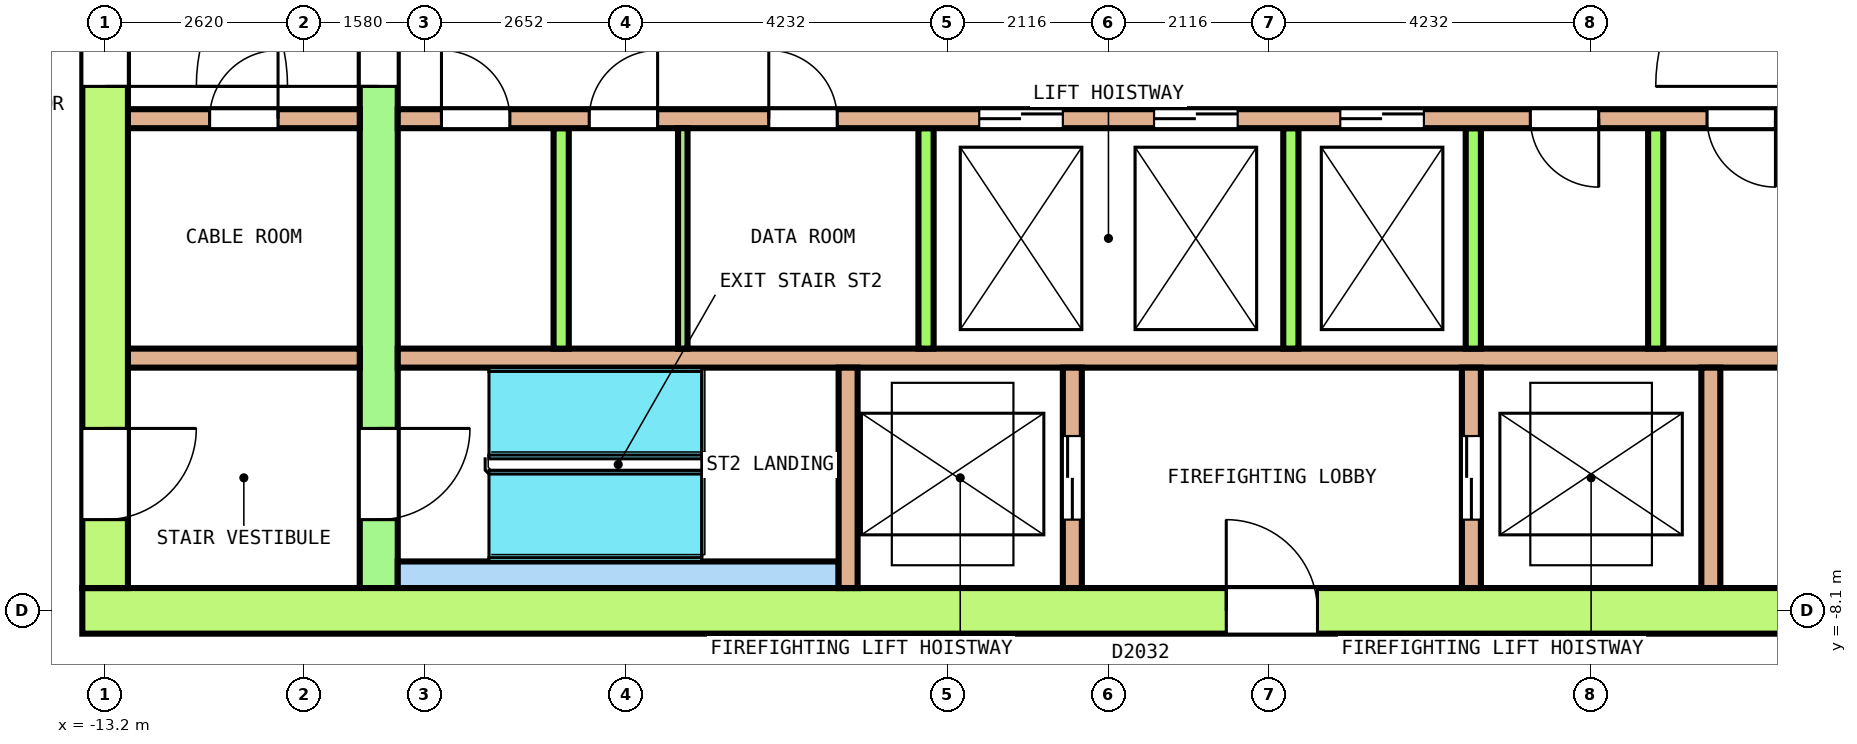
"""IFC4 building model, lengths in metres.
Left out: names, types, materials, properties, quantities, classifications, styles, units other than length and angle.
Written with IfcOpenShell. Run it as: python <this file> out.ifc"""

import sys

from ifc_helpers import new_model, si_unit, direction, frame, frame_2d, origin, place, context, subcontext, project, spatial, polyline, rectangle, outline, extrude, element, fill, save


model = new_model("IFC4")
c1 = context("Model", 3, precision=1e-05, world=origin(), true_north=direction((0.0, 1.0)))
c2 = subcontext(c1, "Body", "Model", "MODEL_VIEW")
j1 = project(units=[si_unit("LENGTHUNIT", "METRE"), si_unit("PLANEANGLEUNIT", "RADIAN")], contexts=[c1])
p1 = place(None, origin())
s1 = spatial("IfcSite", under=j1, at=p1, CompositionType="ELEMENT")
p2 = place(p1, origin())
s2 = spatial("IfcBuilding", under=s1, at=p2, CompositionType="ELEMENT")
p3 = place(p2, frame((0.0, 0.0, 241.4)))
s3 = spatial("IfcBuildingStorey", under=s2, at=p3, CompositionType="ELEMENT", Elevation=241.4)
p4 = place(p3, frame((-23.479, -2.134, 0.0), z_axis=(0.0, 0.0, 1.0), x_axis=(0.500004117472, -0.866023026548, 0.0)))
e1 = element("IfcWall", 1, at=p4, inside=s3, PredefinedType="SOLIDWALL", context=c2, shape_type="SweptSolid", body=[
    extrude(outline(polyline([(-0.027, -0.1), (1.017, -0.1), (2.061, -0.1), (3.105, -0.1), (4.149, -0.1), (5.193, -0.1), (6.237, -0.1), (7.281, -0.1), (8.325, -0.1), (9.369, -0.1), (10.414, -0.1), (11.458, -0.1), (12.501, -0.1), (13.546, -0.1), (14.59, -0.1), (15.634, -0.1), (16.678, -0.1), (17.722, -0.1), (18.766, -0.1), (19.81, -0.1), (19.756, 0.1), (18.718, 0.1), (17.679, 0.1), (16.641, 0.1), (15.603, 0.1), (14.564, 0.1), (13.526, 0.1), (12.488, 0.1), (11.449, 0.1), (10.411, 0.1), (9.372, 0.1), (8.334, 0.1), (7.295, 0.1), (6.257, 0.1), (5.219, 0.1), (4.18, 0.1), (3.142, 0.1), (2.104, 0.1), (1.065, 0.1), (0.027, 0.1), (-0.027, -0.1)])), origin(), (0.0, 0.0, 1.0), 3.7),
])
p5 = place(p4, frame((0.528, 0.0, 0.1)))
e2 = element("IfcOpeningElement", 2, at=p5, cuts=e1, PredefinedType="OPENING", context=c2, shape_type="SweptSolid", body=[
    extrude(rectangle(XDim=2.9, YDim=2.65, at=frame_2d((1.45, 1.325))), frame((0.0, 0.11, 0.0), z_axis=(0.0, -1.0, 0.0), x_axis=(1.0, 0.0, 0.0)), (0.0, 0.0, 1.0), 0.22),
])
p6 = place(p4, frame((4.485, 0.0, 0.1)))
e3 = element("IfcOpeningElement", 3, at=p6, cuts=e1, PredefinedType="OPENING", context=c2, shape_type="SweptSolid", body=[
    extrude(rectangle(XDim=2.9, YDim=2.65, at=frame_2d((1.45, 1.325))), frame((0.0, 0.11, 0.0), z_axis=(0.0, -1.0, 0.0), x_axis=(1.0, 0.0, 0.0)), (0.0, 0.0, 1.0), 0.22),
])
p7 = place(p4, frame((8.991, 0.0, 0.0)))
e4 = element("IfcOpeningElement", 4, at=p7, cuts=e1, PredefinedType="OPENING", context=c2, shape_type="SweptSolid", body=[
    extrude(rectangle(XDim=1.8, YDim=2.4, at=frame_2d((0.9, 1.2))), frame((0.0, 0.11, 0.0), z_axis=(0.0, -1.0, 0.0), x_axis=(1.0, 0.0, 0.0)), (0.0, 0.0, 1.0), 0.22),
])
p8 = place(p4, frame((8.991, 0.0, 2.55)))
e5 = element("IfcOpeningElement", 5, at=p8, cuts=e1, PredefinedType="OPENING", context=c2, shape_type="SweptSolid", body=[
    extrude(rectangle(XDim=1.8, YDim=0.2, at=frame_2d((0.9, 0.1))), frame((0.0, 0.11, 0.0), z_axis=(0.0, -1.0, 0.0), x_axis=(1.0, 0.0, 0.0)), (0.0, 0.0, 1.0), 0.22),
])
p9 = place(p4, frame((12.398, 0.0, 0.1)))
e6 = element("IfcOpeningElement", 6, at=p9, cuts=e1, PredefinedType="OPENING", context=c2, shape_type="SweptSolid", body=[
    extrude(rectangle(XDim=2.9, YDim=2.65, at=frame_2d((1.45, 1.325))), frame((0.0, 0.11, 0.0), z_axis=(0.0, -1.0, 0.0), x_axis=(1.0, 0.0, 0.0)), (0.0, 0.0, 1.0), 0.22),
])
p10 = place(p4, frame((16.355, 0.0, 0.1)))
e7 = element("IfcOpeningElement", 7, at=p10, cuts=e1, PredefinedType="OPENING", context=c2, shape_type="SweptSolid", body=[
    extrude(rectangle(XDim=2.9, YDim=2.65, at=frame_2d((1.45, 1.325))), frame((0.0, 0.11, 0.0), z_axis=(0.0, -1.0, 0.0), x_axis=(1.0, 0.0, 0.0)), (0.0, 0.0, 1.0), 0.22),
])
p11 = place(p3, frame((-13.5, -8.1, 0.0), z_axis=(0.0, 0.0, 1.0), x_axis=(1.0, 0.0, 0.0)))
e8 = element("IfcWall", 8, at=p11, inside=s3, PredefinedType="SHEAR", context=c2, shape_type="SweptSolid", body=[
    extrude(rectangle(XDim=27.0, YDim=0.6, at=frame_2d((13.5, 0.0))), origin(), (0.0, 0.0, 1.0), 3.7),
])
p12 = place(p11, frame((15.05, 0.0, 0.0)))
e9 = element("IfcOpeningElement", 9, at=p12, cuts=e8, PredefinedType="OPENING", context=c2, shape_type="SweptSolid", body=[
    extrude(rectangle(XDim=1.2, YDim=2.1, at=frame_2d((0.6, 1.05))), frame((0.0, 0.31, 0.0), z_axis=(0.0, -1.0, 0.0), x_axis=(1.0, 0.0, 0.0)), (0.0, 0.0, 1.0), 0.62),
])
p13 = place(p3, frame((-13.2, -7.8, 0.0), z_axis=(0.0, 0.0, 1.0), x_axis=(0.0, 1.0, 0.0)))
e10 = element("IfcWall", 10, at=p13, inside=s3, PredefinedType="SHEAR", context=c2, shape_type="SweptSolid", body=[
    extrude(rectangle(XDim=15.6, YDim=0.6, at=frame_2d((7.8, 0.0))), origin(), (0.0, 0.0, 1.0), 3.7),
])
p14 = place(p13, frame((6.6, 0.0, 0.0)))
e11 = element("IfcOpeningElement", 11, at=p14, cuts=e10, PredefinedType="OPENING", context=c2, shape_type="SweptSolid", body=[
    extrude(rectangle(XDim=2.4, YDim=2.1, at=frame_2d((1.2, 1.05))), frame((0.0, 0.31, 0.0), z_axis=(0.0, -1.0, 0.0), x_axis=(1.0, 0.0, 0.0)), (0.0, 0.0, 1.0), 0.62),
])
p15 = place(p13, frame((13.5, 0.0, 0.0)))
e12 = element("IfcOpeningElement", 12, at=p15, cuts=e10, PredefinedType="OPENING", context=c2, shape_type="SweptSolid", body=[
    extrude(rectangle(XDim=1.2, YDim=2.1, at=frame_2d((0.6, 1.05))), frame((0.0, 0.31, 0.0), z_axis=(0.0, -1.0, 0.0), x_axis=(1.0, 0.0, 0.0)), (0.0, 0.0, 1.0), 0.62),
])
p16 = place(p13, frame((0.9, 0.0, 0.0)))
e13 = element("IfcOpeningElement", 13, at=p16, cuts=e10, PredefinedType="OPENING", context=c2, shape_type="SweptSolid", body=[
    extrude(rectangle(XDim=1.2, YDim=2.1, at=frame_2d((0.6, 1.05))), frame((0.0, 0.31, 0.0), z_axis=(0.0, -1.0, 0.0), x_axis=(1.0, 0.0, 0.0)), (0.0, 0.0, 1.0), 0.62),
])
p17 = place(p3, frame((-9.6, -7.8, 0.0), z_axis=(0.0, 0.0, 1.0), x_axis=(0.0, 1.0, 0.0)))
e14 = element("IfcWall", 14, at=p17, inside=s3, PredefinedType="SHEAR", context=c2, shape_type="SweptSolid", body=[
    extrude(rectangle(XDim=15.6, YDim=0.5, at=frame_2d((7.8, 0.0))), origin(), (0.0, 0.0, 1.0), 3.7),
])
p18 = place(p17, frame((6.6, 0.0, 0.0)))
e15 = element("IfcOpeningElement", 15, at=p18, cuts=e14, PredefinedType="OPENING", context=c2, shape_type="SweptSolid", body=[
    extrude(rectangle(XDim=2.4, YDim=2.1, at=frame_2d((1.2, 1.05))), frame((0.0, 0.26, 0.0), z_axis=(0.0, -1.0, 0.0), x_axis=(1.0, 0.0, 0.0)), (0.0, 0.0, 1.0), 0.52),
])
p19 = place(p17, frame((13.5, 0.0, 0.0)))
e16 = element("IfcOpeningElement", 16, at=p19, cuts=e14, PredefinedType="OPENING", context=c2, shape_type="SweptSolid", body=[
    extrude(rectangle(XDim=1.2, YDim=2.1, at=frame_2d((0.6, 1.05))), frame((0.0, 0.26, 0.0), z_axis=(0.0, -1.0, 0.0), x_axis=(1.0, 0.0, 0.0)), (0.0, 0.0, 1.0), 0.52),
])
p20 = place(p17, frame((0.9, 0.0, 0.0)))
e17 = element("IfcOpeningElement", 17, at=p20, cuts=e14, PredefinedType="OPENING", context=c2, shape_type="SweptSolid", body=[
    extrude(rectangle(XDim=1.2, YDim=2.1, at=frame_2d((0.6, 1.05))), frame((0.0, 0.26, 0.0), z_axis=(0.0, -1.0, 0.0), x_axis=(1.0, 0.0, 0.0)), (0.0, 0.0, 1.0), 0.52),
])
p21 = place(p3, frame((-12.9, -1.625, 0.0), z_axis=(0.0, 0.0, 1.0), x_axis=(1.0, 0.0, 0.0)))
e18 = element("IfcWall", 18, at=p21, inside=s3, PredefinedType="SOLIDWALL", context=c2, shape_type="SweptSolid", body=[
    extrude(rectangle(XDim=3.05, YDim=0.25, at=frame_2d((1.525, 0.0))), origin(), (0.0, 0.0, 1.0), 3.7),
])
p22 = place(p21, frame((1.075, 0.0, 0.0)))
e19 = element("IfcOpeningElement", 19, at=p22, cuts=e18, PredefinedType="OPENING", context=c2, shape_type="SweptSolid", body=[
    extrude(rectangle(XDim=0.9, YDim=2.1, at=frame_2d((0.45, 1.05))), frame((0.0, 0.135, 0.0), z_axis=(0.0, -1.0, 0.0), x_axis=(1.0, 0.0, 0.0)), (0.0, 0.0, 1.0), 0.27),
])
p23 = place(p3, frame((-9.35, -1.625, 0.0), z_axis=(0.0, 0.0, 1.0), x_axis=(1.0, 0.0, 0.0)))
e20 = element("IfcWall", 20, at=p23, inside=s3, PredefinedType="SOLIDWALL", context=c2, shape_type="SweptSolid", body=[
    extrude(rectangle(XDim=18.7, YDim=0.25, at=frame_2d((9.35, 0.0))), origin(), (0.0, 0.0, 1.0), 3.7),
])
p24 = place(p23, frame((7.65, 0.0, 0.0)))
e21 = element("IfcOpeningElement", 21, at=p24, cuts=e20, PredefinedType="OPENING", context=c2, shape_type="SweptSolid", body=[
    extrude(rectangle(XDim=1.1, YDim=2.1, at=frame_2d((0.55, 1.05))), frame((0.0, 0.135, 0.0), z_axis=(0.0, -1.0, 0.0), x_axis=(1.0, 0.0, 0.0)), (0.0, 0.0, 1.0), 0.27),
])
p25 = place(p23, frame((9.95, 0.0, 0.0)))
e22 = element("IfcOpeningElement", 22, at=p25, cuts=e20, PredefinedType="OPENING", context=c2, shape_type="SweptSolid", body=[
    extrude(rectangle(XDim=1.1, YDim=2.1, at=frame_2d((0.55, 1.05))), frame((0.0, 0.135, 0.0), z_axis=(0.0, -1.0, 0.0), x_axis=(1.0, 0.0, 0.0)), (0.0, 0.0, 1.0), 0.27),
])
p26 = place(p23, frame((12.4, 0.0, 0.0)))
e23 = element("IfcOpeningElement", 23, at=p26, cuts=e20, PredefinedType="OPENING", context=c2, shape_type="SweptSolid", body=[
    extrude(rectangle(XDim=1.1, YDim=2.1, at=frame_2d((0.55, 1.05))), frame((0.0, 0.135, 0.0), z_axis=(0.0, -1.0, 0.0), x_axis=(1.0, 0.0, 0.0)), (0.0, 0.0, 1.0), 0.27),
])
p27 = place(p23, frame((0.575, 0.0, 0.0)))
e24 = element("IfcOpeningElement", 24, at=p27, cuts=e20, PredefinedType="OPENING", context=c2, shape_type="SweptSolid", body=[
    extrude(rectangle(XDim=0.9, YDim=2.1, at=frame_2d((0.45, 1.05))), frame((0.0, 0.135, 0.0), z_axis=(0.0, -1.0, 0.0), x_axis=(1.0, 0.0, 0.0)), (0.0, 0.0, 1.0), 0.27),
])
p28 = place(p23, frame((2.519, 0.0, 0.0)))
e25 = element("IfcOpeningElement", 25, at=p28, cuts=e20, PredefinedType="OPENING", context=c2, shape_type="SweptSolid", body=[
    extrude(rectangle(XDim=0.9, YDim=2.1, at=frame_2d((0.45, 1.05))), frame((0.0, 0.135, 0.0), z_axis=(0.0, -1.0, 0.0), x_axis=(1.0, 0.0, 0.0)), (0.0, 0.0, 1.0), 0.27),
])
p29 = place(p23, frame((4.881, 0.0, 0.0)))
e26 = element("IfcOpeningElement", 26, at=p29, cuts=e20, PredefinedType="OPENING", context=c2, shape_type="SweptSolid", body=[
    extrude(rectangle(XDim=0.9, YDim=2.1, at=frame_2d((0.45, 1.05))), frame((0.0, 0.135, 0.0), z_axis=(0.0, -1.0, 0.0), x_axis=(1.0, 0.0, 0.0)), (0.0, 0.0, 1.0), 0.27),
])
p30 = place(p23, frame((14.9, 0.0, 0.0)))
e27 = element("IfcOpeningElement", 27, at=p30, cuts=e20, PredefinedType="OPENING", context=c2, shape_type="SweptSolid", body=[
    extrude(rectangle(XDim=0.9, YDim=2.1, at=frame_2d((0.45, 1.05))), frame((0.0, 0.135, 0.0), z_axis=(0.0, -1.0, 0.0), x_axis=(1.0, 0.0, 0.0)), (0.0, 0.0, 1.0), 0.27),
])
p31 = place(p23, frame((17.225, 0.0, 0.0)))
e28 = element("IfcOpeningElement", 28, at=p31, cuts=e20, PredefinedType="OPENING", context=c2, shape_type="SweptSolid", body=[
    extrude(rectangle(XDim=0.9, YDim=2.1, at=frame_2d((0.45, 1.05))), frame((0.0, 0.135, 0.0), z_axis=(0.0, -1.0, 0.0), x_axis=(1.0, 0.0, 0.0)), (0.0, 0.0, 1.0), 0.27),
])
p32 = place(p3, frame((-12.9, -4.775, 0.0), z_axis=(0.0, 0.0, 1.0), x_axis=(1.0, 0.0, 0.0)))
e29 = element("IfcWall", 29, at=p32, inside=s3, PredefinedType="SOLIDWALL", context=c2, shape_type="SweptSolid", body=[
    extrude(rectangle(XDim=3.05, YDim=0.25, at=frame_2d((1.525, 0.0))), origin(), (0.0, 0.0, 1.0), 3.7),
])
p33 = place(p3, frame((-9.35, -4.775, 0.0), z_axis=(0.0, 0.0, 1.0), x_axis=(1.0, 0.0, 0.0)))
e30 = element("IfcWall", 30, at=p33, inside=s3, PredefinedType="SOLIDWALL", context=c2, shape_type="SweptSolid", body=[
    extrude(rectangle(XDim=18.7, YDim=0.25, at=frame_2d((9.35, 0.0))), origin(), (0.0, 0.0, 1.0), 3.7),
])
for number, where, z_axis, x_axis in (
    (31, (-7.2, -4.65, 0.0), (0.0, 0.0, 1.0), (0.0, 1.0, 0.0)),
    (32, (-2.4, -4.65, 0.0), (0.0, 0.0, 1.0), (0.0, 1.0, 0.0)),
    (33, (2.4, -4.65, 0.0), (0.0, 0.0, 1.0), (0.0, 1.0, 0.0)),
    (34, (4.8, -4.65, 0.0), (0.0, 0.0, 1.0), (0.0, 1.0, 0.0)),
    (35, (7.2, -4.65, 0.0), (0.0, 0.0, 1.0), (0.0, 1.0, 0.0)),
):
    element("IfcWall", number, at=place(p3, frame(where, z_axis=z_axis, x_axis=x_axis)), inside=s3, PredefinedType="SOLIDWALL", context=c2, shape_type="SweptSolid", body=[
        extrude(rectangle(XDim=2.9, YDim=0.2, at=frame_2d((1.45, 0.0))), origin(), (0.0, 0.0, 1.0), 3.7),
    ])
p34 = place(p3, frame((-9.35, -7.625, 0.0), z_axis=(0.0, 0.0, 1.0), x_axis=(1.0, 0.0, 0.0)))
e36 = element("IfcWall", 36, at=p34, inside=s3, PredefinedType="SOLIDWALL", context=c2, shape_type="SweptSolid", body=[
    extrude(rectangle(XDim=5.8, YDim=0.35, at=frame_2d((2.9, 0.0))), origin(), (0.0, 0.0, 1.0), 3.7),
])
p35 = place(p3, frame((-3.425, -7.8, 0.0), z_axis=(0.0, 0.0, 1.0), x_axis=(0.0, 1.0, 0.0)))
e37 = element("IfcWall", 37, at=p35, inside=s3, PredefinedType="SOLIDWALL", context=c2, shape_type="SweptSolid", body=[
    extrude(rectangle(XDim=2.9, YDim=0.25, at=frame_2d((1.45, 0.0))), origin(), (0.0, 0.0, 1.0), 3.7),
])
p36 = place(p3, frame((-0.475, -7.8, 0.0), z_axis=(0.0, 0.0, 1.0), x_axis=(0.0, 1.0, 0.0)))
e38 = element("IfcWall", 38, at=p36, inside=s3, PredefinedType="SOLIDWALL", context=c2, shape_type="SweptSolid", body=[
    extrude(rectangle(XDim=2.9, YDim=0.25, at=frame_2d((1.45, 0.0))), origin(), (0.0, 0.0, 1.0), 3.7),
])
p37 = place(p36, frame((0.9, 0.0, 0.0)))
e39 = element("IfcOpeningElement", 39, at=p37, cuts=e38, PredefinedType="OPENING", context=c2, shape_type="SweptSolid", body=[
    extrude(rectangle(XDim=1.1, YDim=2.1, at=frame_2d((0.55, 1.05))), frame((0.0, 0.135, 0.0), z_axis=(0.0, -1.0, 0.0), x_axis=(1.0, 0.0, 0.0)), (0.0, 0.0, 1.0), 0.27),
])
p38 = place(p3, frame((4.775, -7.8, 0.0), z_axis=(0.0, 0.0, 1.0), x_axis=(0.0, 1.0, 0.0)))
e40 = element("IfcWall", 40, at=p38, inside=s3, PredefinedType="SOLIDWALL", context=c2, shape_type="SweptSolid", body=[
    extrude(rectangle(XDim=2.9, YDim=0.25, at=frame_2d((1.45, 0.0))), origin(), (0.0, 0.0, 1.0), 3.7),
])
p39 = place(p38, frame((0.9, 0.0, 0.0)))
e41 = element("IfcOpeningElement", 41, at=p39, cuts=e40, PredefinedType="OPENING", context=c2, shape_type="SweptSolid", body=[
    extrude(rectangle(XDim=1.1, YDim=2.1, at=frame_2d((0.55, 1.05))), frame((0.0, 0.135, 0.0), z_axis=(0.0, -1.0, 0.0), x_axis=(1.0, 0.0, 0.0)), (0.0, 0.0, 1.0), 0.27),
])
p40 = place(p3, frame((7.925, -7.8, 0.0), z_axis=(0.0, 0.0, 1.0), x_axis=(0.0, 1.0, 0.0)))
e42 = element("IfcWall", 42, at=p40, inside=s3, PredefinedType="SOLIDWALL", context=c2, shape_type="SweptSolid", body=[
    extrude(rectangle(XDim=2.9, YDim=0.25, at=frame_2d((1.45, 0.0))), origin(), (0.0, 0.0, 1.0), 3.7),
])
p41 = place(p3, frame((-5.6, -4.65, 0.0), z_axis=(0.0, 0.0, 1.0), x_axis=(0.0, 1.0, 0.0)))
e43 = element("IfcWall", 43, at=p41, inside=s3, PredefinedType="PARTITIONING", context=c2, shape_type="SweptSolid", body=[
    extrude(rectangle(XDim=2.9, YDim=0.125, at=frame_2d((1.45, 0.0))), origin(), (0.0, 0.0, 1.0), 3.7),
])
p42 = place(p24, origin())
e44 = element("IfcDoor", 44, at=p42, inside=s3, OperationType="DOUBLE_DOOR_SLIDING", PredefinedType="DOOR", context=c2, shape_type="SweptSolid", body=[
    extrude(rectangle(XDim=1.1, YDim=2.1, at=frame_2d((0.55, 1.05))), frame((0.0, 0.075, 0.0), z_axis=(0.0, -1.0, 0.0), x_axis=(1.0, 0.0, 0.0)), (0.0, 0.0, 1.0), 0.15),
])
fill(e21, e44)
p43 = place(p25, origin())
e45 = element("IfcDoor", 45, at=p43, inside=s3, OperationType="DOUBLE_DOOR_SLIDING", PredefinedType="DOOR", context=c2, shape_type="SweptSolid", body=[
    extrude(rectangle(XDim=1.1, YDim=2.1, at=frame_2d((0.55, 1.05))), frame((0.0, 0.075, 0.0), z_axis=(0.0, -1.0, 0.0), x_axis=(1.0, 0.0, 0.0)), (0.0, 0.0, 1.0), 0.15),
])
fill(e22, e45)
p44 = place(p26, origin())
e46 = element("IfcDoor", 46, at=p44, inside=s3, OperationType="DOUBLE_DOOR_SLIDING", PredefinedType="DOOR", context=c2, shape_type="SweptSolid", body=[
    extrude(rectangle(XDim=1.1, YDim=2.1, at=frame_2d((0.55, 1.05))), frame((0.0, 0.075, 0.0), z_axis=(0.0, -1.0, 0.0), x_axis=(1.0, 0.0, 0.0)), (0.0, 0.0, 1.0), 0.15),
])
fill(e23, e46)
p45 = place(p37, origin())
e47 = element("IfcDoor", 47, at=p45, inside=s3, OperationType="DOUBLE_DOOR_SLIDING", PredefinedType="DOOR", context=c2, shape_type="SweptSolid", body=[
    extrude(rectangle(XDim=1.1, YDim=2.1, at=frame_2d((0.55, 1.05))), frame((0.0, 0.075, 0.0), z_axis=(0.0, -1.0, 0.0), x_axis=(1.0, 0.0, 0.0)), (0.0, 0.0, 1.0), 0.15),
])
fill(e39, e47)
p46 = place(p39, origin())
e48 = element("IfcDoor", 48, at=p46, inside=s3, OperationType="DOUBLE_DOOR_SLIDING", PredefinedType="DOOR", context=c2, shape_type="SweptSolid", body=[
    extrude(rectangle(XDim=1.1, YDim=2.1, at=frame_2d((0.55, 1.05))), frame((0.0, 0.075, 0.0), z_axis=(0.0, -1.0, 0.0), x_axis=(1.0, 0.0, 0.0)), (0.0, 0.0, 1.0), 0.15),
])
fill(e41, e48)
p47 = place(p18, origin())
e49 = element("IfcDoor", 49, at=p47, inside=s3, OperationType="DOUBLE_DOOR_SINGLE_SWING", PredefinedType="DOOR", context=c2, shape_type="SweptSolid", body=[
    extrude(rectangle(XDim=2.4, YDim=2.1, at=frame_2d((1.2, 1.05))), frame((0.0, 0.2, 0.0), z_axis=(0.0, -1.0, 0.0), x_axis=(1.0, 0.0, 0.0)), (0.0, 0.0, 1.0), 0.4),
])
fill(e15, e49)
p48 = place(p14, origin())
e50 = element("IfcDoor", 50, at=p48, inside=s3, OperationType="DOUBLE_DOOR_SINGLE_SWING", PredefinedType="DOOR", context=c2, shape_type="SweptSolid", body=[
    extrude(rectangle(XDim=2.4, YDim=2.1, at=frame_2d((1.2, 1.05))), frame((0.0, 0.25, 0.0), z_axis=(0.0, -1.0, 0.0), x_axis=(1.0, 0.0, 0.0)), (0.0, 0.0, 1.0), 0.5),
])
fill(e11, e50)
p49 = place(p20, origin())
e51 = element("IfcDoor", 51, at=p49, inside=s3, OperationType="SINGLE_SWING_RIGHT", PredefinedType="DOOR", context=c2, shape_type="SweptSolid", body=[
    extrude(rectangle(XDim=1.2, YDim=2.1, at=frame_2d((0.6, 1.05))), frame((0.0, 0.2, 0.0), z_axis=(0.0, -1.0, 0.0), x_axis=(1.0, 0.0, 0.0)), (0.0, 0.0, 1.0), 0.4),
])
fill(e17, e51)
p50 = place(p16, origin())
e52 = element("IfcDoor", 52, at=p50, inside=s3, OperationType="SINGLE_SWING_LEFT", PredefinedType="DOOR", context=c2, shape_type="SweptSolid", body=[
    extrude(rectangle(XDim=1.2, YDim=2.1, at=frame_2d((0.6, 1.05))), frame((0.0, 0.25, 0.0), z_axis=(0.0, -1.0, 0.0), x_axis=(1.0, 0.0, 0.0)), (0.0, 0.0, 1.0), 0.5),
])
fill(e13, e52)
p51 = place(p12, origin())
e53 = element("IfcDoor", 53, at=p51, inside=s3, OperationType="SINGLE_SWING_RIGHT", PredefinedType="DOOR", context=c2, shape_type="SweptSolid", body=[
    extrude(rectangle(XDim=1.2, YDim=2.1, at=frame_2d((0.6, 1.05))), frame((0.0, 0.25, 0.0), z_axis=(0.0, -1.0, 0.0), x_axis=(1.0, 0.0, 0.0)), (0.0, 0.0, 1.0), 0.5),
])
fill(e9, e53)
p52 = place(p22, origin())
e54 = element("IfcDoor", 54, at=p52, inside=s3, OperationType="SINGLE_SWING_LEFT", PredefinedType="DOOR", context=c2, shape_type="SweptSolid", body=[
    extrude(rectangle(XDim=0.9, YDim=2.1, at=frame_2d((0.45, 1.05))), frame((0.0, 0.075, 0.0), z_axis=(0.0, -1.0, 0.0), x_axis=(1.0, 0.0, 0.0)), (0.0, 0.0, 1.0), 0.15),
])
fill(e19, e54)
p53 = place(p27, origin())
e55 = element("IfcDoor", 55, at=p53, inside=s3, OperationType="SINGLE_SWING_RIGHT", PredefinedType="DOOR", context=c2, shape_type="SweptSolid", body=[
    extrude(rectangle(XDim=0.9, YDim=2.1, at=frame_2d((0.45, 1.05))), frame((0.0, 0.075, 0.0), z_axis=(0.0, -1.0, 0.0), x_axis=(1.0, 0.0, 0.0)), (0.0, 0.0, 1.0), 0.15),
])
fill(e24, e55)
p54 = place(p28, origin())
e56 = element("IfcDoor", 56, at=p54, inside=s3, OperationType="SINGLE_SWING_LEFT", PredefinedType="DOOR", context=c2, shape_type="SweptSolid", body=[
    extrude(rectangle(XDim=0.9, YDim=2.1, at=frame_2d((0.45, 1.05))), frame((0.0, 0.075, 0.0), z_axis=(0.0, -1.0, 0.0), x_axis=(1.0, 0.0, 0.0)), (0.0, 0.0, 1.0), 0.15),
])
fill(e25, e56)
p55 = place(p29, origin())
e57 = element("IfcDoor", 57, at=p55, inside=s3, OperationType="SINGLE_SWING_RIGHT", PredefinedType="DOOR", context=c2, shape_type="SweptSolid", body=[
    extrude(rectangle(XDim=0.9, YDim=2.1, at=frame_2d((0.45, 1.05))), frame((0.0, 0.075, 0.0), z_axis=(0.0, -1.0, 0.0), x_axis=(1.0, 0.0, 0.0)), (0.0, 0.0, 1.0), 0.15),
])
fill(e26, e57)
p56 = place(p30, origin())
e58 = element("IfcDoor", 58, at=p56, inside=s3, OperationType="SINGLE_SWING_LEFT", PredefinedType="DOOR", context=c2, shape_type="SweptSolid", body=[
    extrude(rectangle(XDim=0.9, YDim=2.1, at=frame_2d((0.45, 1.05))), frame((0.0, 0.075, 0.0), z_axis=(0.0, -1.0, 0.0), x_axis=(1.0, 0.0, 0.0)), (0.0, 0.0, 1.0), 0.15),
])
fill(e27, e58)
p57 = place(p31, origin())
e59 = element("IfcDoor", 59, at=p57, inside=s3, OperationType="SINGLE_SWING_RIGHT", PredefinedType="DOOR", context=c2, shape_type="SweptSolid", body=[
    extrude(rectangle(XDim=0.9, YDim=2.1, at=frame_2d((0.45, 1.05))), frame((0.0, 0.075, 0.0), z_axis=(0.0, -1.0, 0.0), x_axis=(1.0, 0.0, 0.0)), (0.0, 0.0, 1.0), 0.15),
])
fill(e28, e59)
save(model, sys.argv[1])
